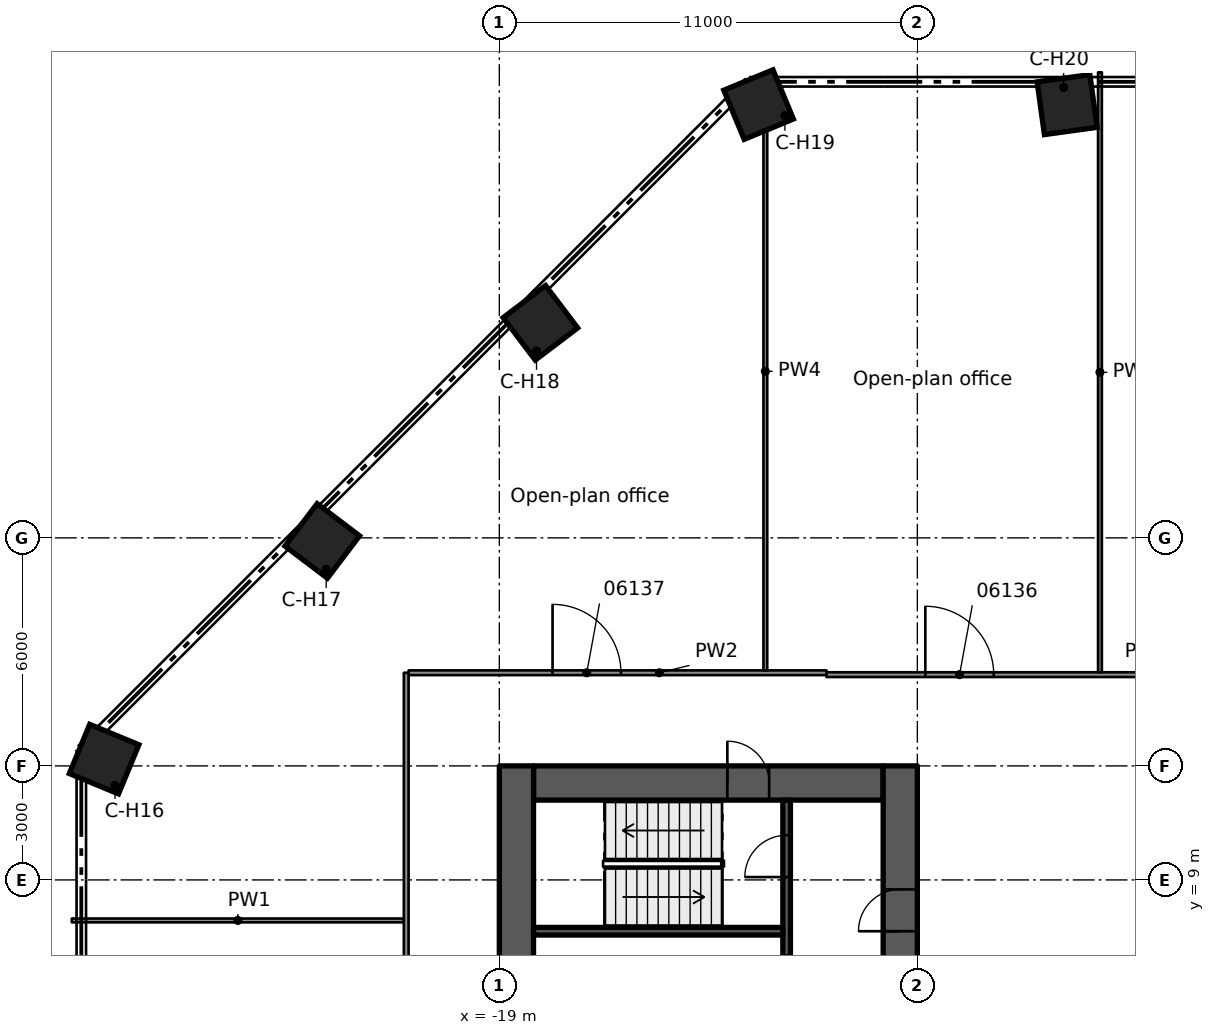
"""IFC4 building model, lengths in metres.
Left out: names, types, materials, properties, quantities, classifications, styles, units other than length and angle.
Written with IfcOpenShell. Run it as: python <this file> out.ifc"""

import sys

from ifc_helpers import new_model, si_unit, direction, frame, frame_2d, origin, origin_2d, place, context, subcontext, project, spatial, rectangle, extrude, element, fill, save


model = new_model("IFC4")
c1 = context("Model", 3, precision=1e-05, world=origin(), true_north=direction((0.0, 1.0)))
c2 = subcontext(c1, "Body", "Model", "MODEL_VIEW")
j1 = project(units=[si_unit("LENGTHUNIT", "METRE"), si_unit("PLANEANGLEUNIT", "RADIAN")], contexts=[c1])
p1 = place(None, origin())
s1 = spatial("IfcSite", under=j1, at=p1, CompositionType="ELEMENT")
p2 = place(p1, origin())
s2 = spatial("IfcBuilding", under=s1, at=p2, CompositionType="ELEMENT")
p3 = place(p2, frame((0.0, 0.0, 29.2)))
s3 = spatial("IfcBuildingStorey", under=s2, at=p3, CompositionType="ELEMENT", Elevation=29.2)
p4 = place(p3, frame((-18.1, 11.55, 0.0), z_axis=(0.0, 0.0, 1.0), x_axis=(1.0, 0.0, 0.0)))
e1 = element("IfcWall", 1, at=p4, inside=s3, PredefinedType="SHEAR", context=c2, shape_type="SweptSolid", body=[
    extrude(rectangle(XDim=9.2, YDim=0.9, at=frame_2d((4.6, 0.0))), origin(), (0.0, 0.0, 1.0), 4.1),
])
p5 = place(p4, frame((5.1, 0.0, 0.0)))
e2 = element("IfcOpeningElement", 2, at=p5, cuts=e1, PredefinedType="OPENING", context=c2, shape_type="SweptSolid", body=[
    extrude(rectangle(XDim=1.1, YDim=2.1, at=frame_2d((0.55, 1.05))), frame((0.0, 0.46, 0.0), z_axis=(0.0, -1.0, 0.0), x_axis=(1.0, 0.0, 0.0)), (0.0, 0.0, 1.0), 0.92),
])
p6 = place(p3, frame((-18.55, -12.0, 0.0), z_axis=(0.0, 0.0, 1.0), x_axis=(0.0, 1.0, 0.0)))
e3 = element("IfcWall", 3, at=p6, inside=s3, PredefinedType="SHEAR", context=c2, shape_type="SweptSolid", body=[
    extrude(rectangle(XDim=24.0, YDim=0.9, at=frame_2d((12.0, 0.0))), origin(), (0.0, 0.0, 1.0), 4.1),
])
p7 = place(p6, frame((10.1, 0.0, 0.0)))
e4 = element("IfcOpeningElement", 4, at=p7, cuts=e3, PredefinedType="OPENING", context=c2, shape_type="SweptSolid", body=[
    extrude(rectangle(XDim=1.8, YDim=2.1, at=frame_2d((0.9, 1.05))), frame((0.0, 0.46, 0.0), z_axis=(0.0, -1.0, 0.0), x_axis=(1.0, 0.0, 0.0)), (0.0, 0.0, 1.0), 0.92),
])
p8 = place(p3, frame((-8.45, -12.0, 0.0), z_axis=(0.0, 0.0, 1.0), x_axis=(0.0, 1.0, 0.0)))
e5 = element("IfcWall", 5, at=p8, inside=s3, PredefinedType="SHEAR", context=c2, shape_type="SweptSolid", body=[
    extrude(rectangle(XDim=24.0, YDim=0.9, at=frame_2d((12.0, 0.0))), origin(), (0.0, 0.0, 1.0), 4.1),
])
p9 = place(p8, frame((9.6, 0.0, 0.0)))
e6 = element("IfcOpeningElement", 6, at=p9, cuts=e5, PredefinedType="OPENING", context=c2, shape_type="SweptSolid", body=[
    extrude(rectangle(XDim=1.8, YDim=2.1, at=frame_2d((0.9, 1.05))), frame((0.0, 0.46, 0.0), z_axis=(0.0, -1.0, 0.0), x_axis=(1.0, 0.0, 0.0)), (0.0, 0.0, 1.0), 0.92),
])
p10 = place(p8, frame((19.65, 0.0, 0.0)))
e7 = element("IfcOpeningElement", 7, at=p10, cuts=e5, PredefinedType="OPENING", context=c2, shape_type="SweptSolid", body=[
    extrude(rectangle(XDim=1.1, YDim=2.1, at=frame_2d((0.55, 1.05))), frame((0.0, 0.46, 0.0), z_axis=(0.0, -1.0, 0.0), x_axis=(1.0, 0.0, 0.0)), (0.0, 0.0, 1.0), 0.92),
])
for number, where, z_axis, x_axis in (
    (8, (-29.4, 12.178, 0.0), (0.0, 0.0, 1.0), (-0.924, 0.383, 0.0)),
    (9, (-23.659, 17.919, 0.0), (0.0, 0.0, 1.0), (-0.797, 0.604, 0.0)),
    (10, (-17.919, 23.659, 0.0), (0.0, 0.0, 1.0), (-0.604, 0.797, 0.0)),
    (11, (-12.178, 29.4, 0.0), (0.0, 0.0, 1.0), (-0.383, 0.924, 0.0)),
    (12, (-4.059, 29.4, 0.0), (0.0, 0.0, 1.0), (-0.137, 0.991, 0.0)),
):
    element("IfcColumn", number, at=place(p3, frame(where, z_axis=z_axis, x_axis=x_axis)), inside=s3, PredefinedType="COLUMN", context=c2, shape_type="SweptSolid", body=[
        extrude(rectangle(XDim=1.4, YDim=1.4, at=origin_2d()), origin(), (0.0, 0.0, 1.0), 4.1),
    ])
p11 = place(p3, frame((-11.44, 6.975, 0.0), z_axis=(0.0, 0.0, 1.0), x_axis=(0.0, 1.0, 0.0)))
e13 = element("IfcWall", 13, at=p11, inside=s3, PredefinedType="SOLIDWALL", context=c2, shape_type="SweptSolid", body=[
    extrude(rectangle(XDim=4.125, YDim=0.2, at=frame_2d((2.062, 0.0))), origin(), (0.0, 0.0, 1.0), 3.68),
])
p12 = place(p11, frame((2.1, 0.0, 0.0)))
e14 = element("IfcOpeningElement", 14, at=p12, cuts=e13, PredefinedType="OPENING", context=c2, shape_type="SweptSolid", body=[
    extrude(rectangle(XDim=1.1, YDim=2.1, at=frame_2d((0.55, 1.05))), frame((0.0, 0.11, 0.0), z_axis=(0.0, -1.0, 0.0), x_axis=(1.0, 0.0, 0.0)), (0.0, 0.0, 1.0), 0.22),
])
p13 = place(p3, frame((-11.54, 7.65, 0.0), z_axis=(0.0, 0.0, 1.0), x_axis=(-1.0, 0.0, 0.0)))
e15 = element("IfcWall", 15, at=p13, inside=s3, PredefinedType="SOLIDWALL", context=c2, shape_type="SweptSolid", body=[
    extrude(rectangle(XDim=6.56, YDim=0.2, at=frame_2d((3.28, 0.0))), origin(), (0.0, 0.0, 1.0), 3.68),
])
p14 = place(p3, frame((-30.25, 7.934, 0.0), z_axis=(0.0, 0.0, 1.0), x_axis=(1.0, 0.0, 0.0)))
e16 = element("IfcWall", 16, at=p14, inside=s3, PredefinedType="PARTITIONING", context=c2, shape_type="SweptSolid", body=[
    extrude(rectangle(XDim=8.738, YDim=0.1, at=frame_2d((4.369, 0.0))), origin(), (0.0, 0.0, 1.0), 3.66),
])
p15 = place(p3, frame((-10.39, 14.401, 0.0), z_axis=(0.0, 0.0, 1.0), x_axis=(1.0, 0.0, 0.0)))
e17 = element("IfcWall", 17, at=p15, inside=s3, PredefinedType="PARTITIONING", context=c2, shape_type="SweptSolid", body=[
    extrude(rectangle(XDim=20.781, YDim=0.125, at=frame_2d((10.391, 0.0))), origin(), (0.0, 0.0, 1.0), 3.66),
])
p16 = place(p15, frame((10.295, 0.0, 0.0)))
e18 = element("IfcOpeningElement", 18, at=p16, cuts=e17, PredefinedType="OPENING", context=c2, shape_type="SweptSolid", body=[
    extrude(rectangle(XDim=1.1, YDim=2.1, at=frame_2d((0.55, 1.05))), frame((0.0, 0.073, 0.0), z_axis=(0.0, -1.0, 0.0), x_axis=(1.0, 0.0, 0.0)), (0.0, 0.0, 1.0), 0.145),
])
p17 = place(p15, frame((2.6, 0.0, 0.0)))
e19 = element("IfcOpeningElement", 19, at=p17, cuts=e17, PredefinedType="OPENING", context=c2, shape_type="SweptSolid", body=[
    extrude(rectangle(XDim=1.8, YDim=2.1, at=frame_2d((0.9, 1.05))), frame((0.0, 0.073, 0.0), z_axis=(0.0, -1.0, 0.0), x_axis=(1.0, 0.0, 0.0)), (0.0, 0.0, 1.0), 0.145),
])
p18 = place(p3, frame((-21.387, 14.451, 0.0), z_axis=(0.0, 0.0, 1.0), x_axis=(1.0, 0.0, 0.0)))
e20 = element("IfcWall", 20, at=p18, inside=s3, PredefinedType="PARTITIONING", context=c2, shape_type="SweptSolid", body=[
    extrude(rectangle(XDim=10.996, YDim=0.125, at=frame_2d((5.498, 0.0))), origin(), (0.0, 0.0, 1.0), 3.66),
])
p19 = place(p18, frame((3.788, 0.0, 0.0)))
e21 = element("IfcOpeningElement", 21, at=p19, cuts=e20, PredefinedType="OPENING", context=c2, shape_type="SweptSolid", body=[
    extrude(rectangle(XDim=1.8, YDim=2.1, at=frame_2d((0.9, 1.05))), frame((0.0, 0.073, 0.0), z_axis=(0.0, -1.0, 0.0), x_axis=(1.0, 0.0, 0.0)), (0.0, 0.0, 1.0), 0.145),
])
p20 = place(p3, frame((-3.195, 14.463, 0.0), z_axis=(0.0, 0.0, 1.0), x_axis=(0.0, 1.0, 0.0)))
e22 = element("IfcWall", 22, at=p20, inside=s3, PredefinedType="PARTITIONING", context=c2, shape_type="SweptSolid", body=[
    extrude(rectangle(XDim=15.787, YDim=0.1, at=frame_2d((7.894, 0.0))), origin(), (0.0, 0.0, 1.0), 3.66),
])
p21 = place(p3, frame((-12.0, 14.514, 0.0), z_axis=(0.0, 0.0, 1.0), x_axis=(0.0, 1.0, 0.0)))
e23 = element("IfcWall", 23, at=p21, inside=s3, PredefinedType="PARTITIONING", context=c2, shape_type="SweptSolid", body=[
    extrude(rectangle(XDim=15.736, YDim=0.1, at=frame_2d((7.868, 0.0))), origin(), (0.0, 0.0, 1.0), 3.025),
])
p22 = place(p3, frame((-21.45, -11.607, 0.0), z_axis=(0.0, 0.0, 1.0), x_axis=(0.0, 1.0, 0.0)))
e24 = element("IfcWall", 24, at=p22, inside=s3, PredefinedType="PARTITIONING", context=c2, shape_type="SweptSolid", body=[
    extrude(rectangle(XDim=26.058, YDim=0.125, at=frame_2d((13.029, 0.0))), origin(), (0.0, 0.0, 1.0), 3.66),
])
p23 = place(p22, frame((2.6, 0.0, 0.0)))
e25 = element("IfcOpeningElement", 25, at=p23, cuts=e24, PredefinedType="OPENING", context=c2, shape_type="SweptSolid", body=[
    extrude(rectangle(XDim=1.8, YDim=2.1, at=frame_2d((0.9, 1.05))), frame((0.0, 0.073, 0.0), z_axis=(0.0, -1.0, 0.0), x_axis=(1.0, 0.0, 0.0)), (0.0, 0.0, 1.0), 0.145),
])
p24 = place(p22, frame((15.877, 0.0, 0.0)))
e26 = element("IfcOpeningElement", 26, at=p24, cuts=e24, PredefinedType="OPENING", context=c2, shape_type="SweptSolid", body=[
    extrude(rectangle(XDim=1.0, YDim=2.1, at=frame_2d((0.5, 1.05))), frame((0.0, 0.073, 0.0), z_axis=(0.0, -1.0, 0.0), x_axis=(1.0, 0.0, 0.0)), (0.0, 0.0, 1.0), 0.145),
])
p25 = place(p22, frame((9.378, 0.0, 0.0)))
e27 = element("IfcOpeningElement", 27, at=p25, cuts=e24, PredefinedType="OPENING", context=c2, shape_type="SweptSolid", body=[
    extrude(rectangle(XDim=1.1, YDim=2.1, at=frame_2d((0.55, 1.05))), frame((0.0, 0.073, 0.0), z_axis=(0.0, -1.0, 0.0), x_axis=(1.0, 0.0, 0.0)), (0.0, 0.0, 1.0), 0.145),
])
p26 = place(p10, origin())
e28 = element("IfcDoor", 28, at=p26, inside=s3, OperationType="SINGLE_SWING_RIGHT", PredefinedType="DOOR", context=c2, shape_type="SweptSolid", body=[
    extrude(rectangle(XDim=1.1, YDim=2.1, at=frame_2d((0.55, 1.05))), frame((0.0, 0.025, 0.0), z_axis=(0.0, -1.0, 0.0), x_axis=(1.0, 0.0, 0.0)), (0.0, 0.0, 1.0), 0.05),
])
fill(e7, e28)
p27 = place(p5, origin())
e29 = element("IfcDoor", 29, at=p27, inside=s3, OperationType="SINGLE_SWING_RIGHT", PredefinedType="DOOR", context=c2, shape_type="SweptSolid", body=[
    extrude(rectangle(XDim=1.1, YDim=2.1, at=frame_2d((0.55, 1.05))), frame((0.0, 0.025, 0.0), z_axis=(0.0, -1.0, 0.0), x_axis=(1.0, 0.0, 0.0)), (0.0, 0.0, 1.0), 0.05),
])
fill(e2, e29)
p28 = place(p12, origin())
e30 = element("IfcDoor", 30, at=p28, inside=s3, OperationType="SINGLE_SWING_RIGHT", PredefinedType="DOOR", context=c2, shape_type="SweptSolid", body=[
    extrude(rectangle(XDim=1.1, YDim=2.1, at=frame_2d((0.55, 1.05))), frame((0.0, 0.025, 0.0), z_axis=(0.0, -1.0, 0.0), x_axis=(1.0, 0.0, 0.0)), (0.0, 0.0, 1.0), 0.05),
])
fill(e14, e30)
p29 = place(p17, origin())
e31 = element("IfcDoor", 31, at=p29, inside=s3, OperationType="DOUBLE_DOOR_SINGLE_SWING", PredefinedType="DOOR", context=c2, shape_type="SweptSolid", body=[
    extrude(rectangle(XDim=1.8, YDim=2.1, at=frame_2d((0.9, 1.05))), frame((0.0, 0.025, 0.0), z_axis=(0.0, -1.0, 0.0), x_axis=(1.0, 0.0, 0.0)), (0.0, 0.0, 1.0), 0.05),
])
fill(e19, e31)
p30 = place(p19, origin())
e32 = element("IfcDoor", 32, at=p30, inside=s3, OperationType="DOUBLE_DOOR_SINGLE_SWING", PredefinedType="DOOR", context=c2, shape_type="SweptSolid", body=[
    extrude(rectangle(XDim=1.8, YDim=2.1, at=frame_2d((0.9, 1.05))), frame((0.0, 0.025, 0.0), z_axis=(0.0, -1.0, 0.0), x_axis=(1.0, 0.0, 0.0)), (0.0, 0.0, 1.0), 0.05),
])
fill(e21, e32)
save(model, sys.argv[1])
